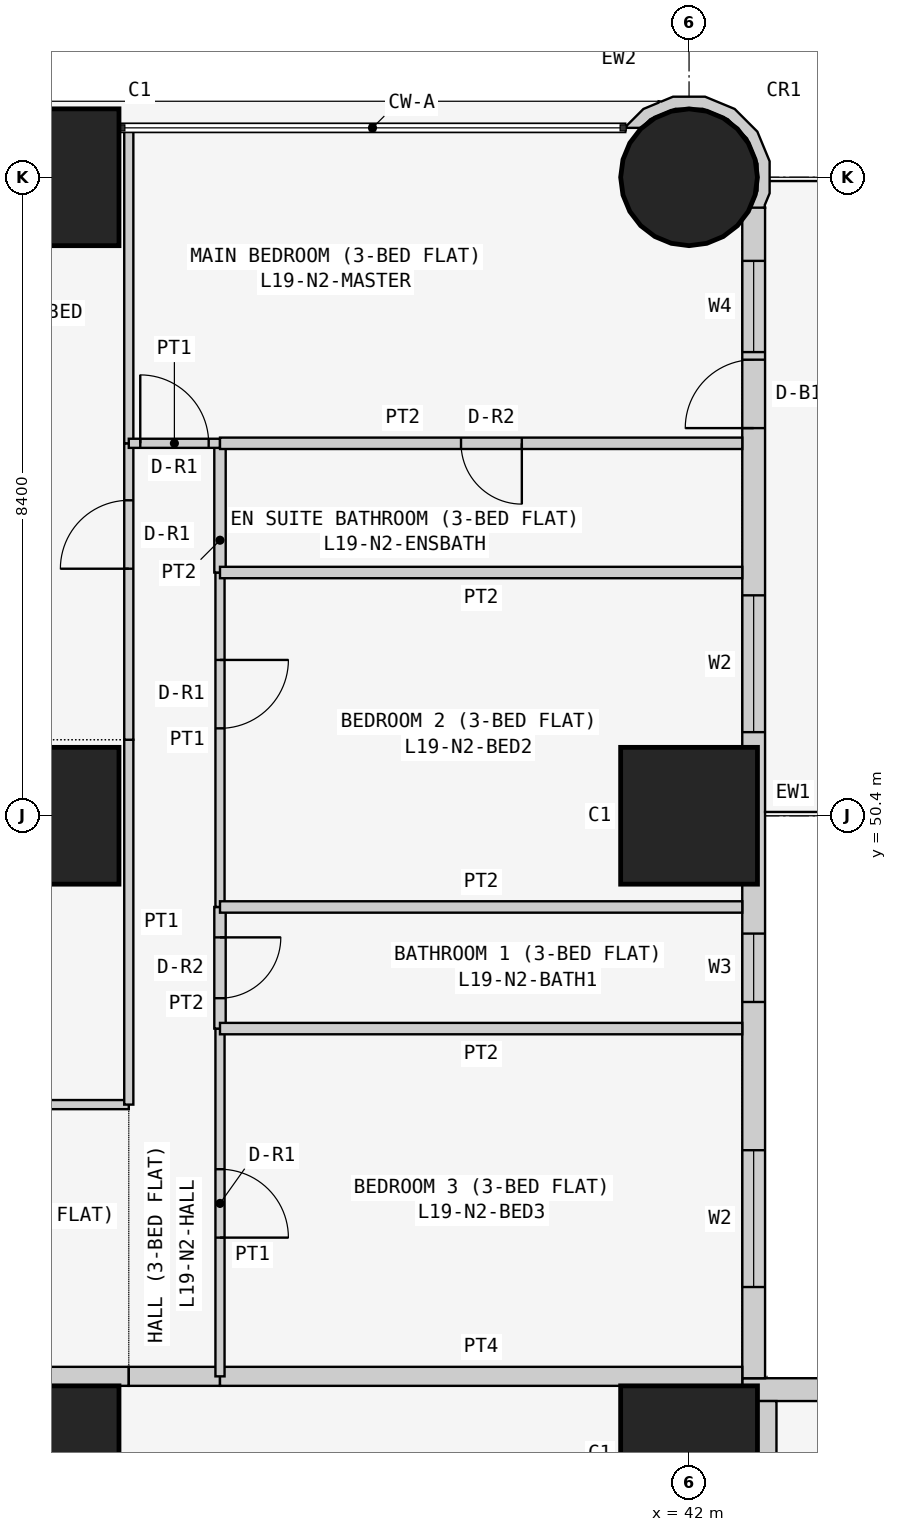
"""IFC4 building model, lengths in metres.
Left out: names, types, materials, properties, quantities, classifications, styles, units other than length and angle.
Written with IfcOpenShell. Run it as: python <this file> out.ifc"""

import sys

from ifc_helpers import new_model, si_unit, direction, frame, frame_2d, origin, origin_2d, place, context, subcontext, project, spatial, polyline, rectangle, circle, outline, extrude, element, fill, save


model = new_model("IFC4")
c1 = context("Model", 3, precision=1e-05, world=origin(), true_north=direction((0.0, 1.0)))
c2 = subcontext(c1, "Body", "Model", "MODEL_VIEW")
j1 = project(units=[si_unit("LENGTHUNIT", "METRE"), si_unit("PLANEANGLEUNIT", "RADIAN")], contexts=[c1])
p1 = place(None, origin())
s1 = spatial("IfcSite", under=j1, at=p1, CompositionType="ELEMENT")
p2 = place(p1, origin())
s2 = spatial("IfcBuilding", under=s1, at=p2, CompositionType="ELEMENT")
p3 = place(p2, frame((0.0, 0.0, 77.7)))
s3 = spatial("IfcBuildingStorey", under=s2, at=p3, CompositionType="ELEMENT", Elevation=77.7)
for number, where, z_axis, x_axis in (
    (1, (33.6, 42.0, 0.0), (0.0, 0.0, 1.0), (1.0, 0.0, 0.0)),
    (2, (33.6, 50.4, 0.0), (0.0, 0.0, 1.0), (1.0, 0.0, 0.0)),
    (3, (33.6, 58.8, 0.0), (0.0, 0.0, 1.0), (1.0, 0.0, 0.0)),
    (4, (42.0, 42.0, 0.0), (0.0, 0.0, 1.0), (1.0, 0.0, 0.0)),
    (5, (42.0, 50.4, 0.0), (0.0, 0.0, 1.0), (1.0, 0.0, 0.0)),
):
    element("IfcColumn", number, at=place(p3, frame(where, z_axis=z_axis, x_axis=x_axis)), inside=s3, PredefinedType="COLUMN", context=c2, shape_type="SweptSolid", body=[
        extrude(rectangle(XDim=1.8, YDim=1.8, at=origin_2d()), origin(), (0.0, 0.0, 1.0), 3.6),
    ])
p4 = place(p3, frame((42.0, 58.8, 0.0), z_axis=(0.0, 0.0, 1.0), x_axis=(1.0, 0.0, 0.0)))
e6 = element("IfcColumn", 6, at=p4, inside=s3, PredefinedType="COLUMN", context=c2, shape_type="SweptSolid", body=[
    extrude(circle(Radius=0.9, at=origin_2d()), origin(), (0.0, 0.0, 1.0), 3.6),
])
p5 = place(p3, frame((58.4, 42.85, 0.0), z_axis=(0.0, 0.0, 1.0), x_axis=(-1.0, 0.0, 0.0)))
e7 = element("IfcWall", 7, at=p5, inside=s3, PredefinedType="SOLIDWALL", context=c2, shape_type="SweptSolid", body=[
    extrude(rectangle(XDim=15.7, YDim=0.3, at=frame_2d((7.85, 0.0))), origin(), (0.0, 0.0, 1.0), 3.45),
])
p6 = place(p5, frame((12.4, 0.0, 0.9)))
e8 = element("IfcOpeningElement", 8, at=p6, cuts=e7, PredefinedType="OPENING", context=c2, shape_type="SweptSolid", body=[
    extrude(rectangle(XDim=1.8, YDim=1.5, at=frame_2d((0.9, 0.75))), frame((0.0, 0.16, 0.0), z_axis=(0.0, -1.0, 0.0), x_axis=(1.0, 0.0, 0.0)), (0.0, 0.0, 1.0), 0.32),
])
p7 = place(p5, frame((9.55, 0.0, 1.5)))
e9 = element("IfcOpeningElement", 9, at=p7, cuts=e7, PredefinedType="OPENING", context=c2, shape_type="SweptSolid", body=[
    extrude(rectangle(XDim=0.9, YDim=0.7, at=frame_2d((0.45, 0.35))), frame((0.0, 0.16, 0.0), z_axis=(0.0, -1.0, 0.0), x_axis=(1.0, 0.0, 0.0)), (0.0, 0.0, 1.0), 0.32),
])
p8 = place(p5, frame((5.1, 0.0, 0.9)))
e10 = element("IfcOpeningElement", 10, at=p8, cuts=e7, PredefinedType="OPENING", context=c2, shape_type="SweptSolid", body=[
    extrude(rectangle(XDim=1.8, YDim=1.5, at=frame_2d((0.9, 0.75))), frame((0.0, 0.16, 0.0), z_axis=(0.0, -1.0, 0.0), x_axis=(1.0, 0.0, 0.0)), (0.0, 0.0, 1.0), 0.32),
])
p9 = place(p5, frame((2.0, 0.0, 0.0)))
e11 = element("IfcOpeningElement", 11, at=p9, cuts=e7, PredefinedType="OPENING", context=c2, shape_type="SweptSolid", body=[
    extrude(rectangle(XDim=0.9, YDim=2.4, at=frame_2d((0.45, 1.2))), frame((0.0, 0.16, 0.0), z_axis=(0.0, -1.0, 0.0), x_axis=(1.0, 0.0, 0.0)), (0.0, 0.0, 1.0), 0.32),
])
p10 = place(p5, frame((0.7, 0.0, 0.9)))
e12 = element("IfcOpeningElement", 12, at=p10, cuts=e7, PredefinedType="OPENING", context=c2, shape_type="SweptSolid", body=[
    extrude(rectangle(XDim=1.2, YDim=1.5, at=frame_2d((0.6, 0.75))), frame((0.0, 0.16, 0.0), z_axis=(0.0, -1.0, 0.0), x_axis=(1.0, 0.0, 0.0)), (0.0, 0.0, 1.0), 0.32),
])
p11 = place(p3, frame((42.85, 43.0, 0.0), z_axis=(0.0, 0.0, 1.0), x_axis=(0.0, 1.0, 0.0)))
e13 = element("IfcWall", 13, at=p11, inside=s3, PredefinedType="SOLIDWALL", context=c2, shape_type="SweptSolid", body=[
    extrude(rectangle(XDim=15.4, YDim=0.3, at=frame_2d((7.7, 0.0))), origin(), (0.0, 0.0, 1.0), 3.45),
])
p12 = place(p11, frame((1.2, 0.0, 0.9)))
e14 = element("IfcOpeningElement", 14, at=p12, cuts=e13, PredefinedType="OPENING", context=c2, shape_type="SweptSolid", body=[
    extrude(rectangle(XDim=1.8, YDim=1.5, at=frame_2d((0.9, 0.75))), frame((0.0, 0.16, 0.0), z_axis=(0.0, -1.0, 0.0), x_axis=(1.0, 0.0, 0.0)), (0.0, 0.0, 1.0), 0.32),
])
p13 = place(p11, frame((4.95, 0.0, 1.5)))
e15 = element("IfcOpeningElement", 15, at=p13, cuts=e13, PredefinedType="OPENING", context=c2, shape_type="SweptSolid", body=[
    extrude(rectangle(XDim=0.9, YDim=0.7, at=frame_2d((0.45, 0.35))), frame((0.0, 0.16, 0.0), z_axis=(0.0, -1.0, 0.0), x_axis=(1.0, 0.0, 0.0)), (0.0, 0.0, 1.0), 0.32),
])
p14 = place(p11, frame((8.5, 0.0, 0.9)))
e16 = element("IfcOpeningElement", 16, at=p14, cuts=e13, PredefinedType="OPENING", context=c2, shape_type="SweptSolid", body=[
    extrude(rectangle(XDim=1.8, YDim=1.5, at=frame_2d((0.9, 0.75))), frame((0.0, 0.16, 0.0), z_axis=(0.0, -1.0, 0.0), x_axis=(1.0, 0.0, 0.0)), (0.0, 0.0, 1.0), 0.32),
])
p15 = place(p11, frame((12.5, 0.0, 0.0)))
e17 = element("IfcOpeningElement", 17, at=p15, cuts=e13, PredefinedType="OPENING", context=c2, shape_type="SweptSolid", body=[
    extrude(rectangle(XDim=0.9, YDim=2.4, at=frame_2d((0.45, 1.2))), frame((0.0, 0.16, 0.0), z_axis=(0.0, -1.0, 0.0), x_axis=(1.0, 0.0, 0.0)), (0.0, 0.0, 1.0), 0.32),
])
p16 = place(p11, frame((13.5, 0.0, 0.9)))
e18 = element("IfcOpeningElement", 18, at=p16, cuts=e13, PredefinedType="OPENING", context=c2, shape_type="SweptSolid", body=[
    extrude(rectangle(XDim=1.2, YDim=1.5, at=frame_2d((0.6, 0.75))), frame((0.0, 0.16, 0.0), z_axis=(0.0, -1.0, 0.0), x_axis=(1.0, 0.0, 0.0)), (0.0, 0.0, 1.0), 0.32),
])
p17 = place(p3, frame((42.91, 58.436, 0.0), z_axis=(0.0, 0.0, 1.0), x_axis=(0.377204953059, 0.926129809145, 0.0)))
e19 = element("IfcWall", 19, at=p17, inside=s3, PredefinedType="SOLIDWALL", context=c2, shape_type="SweptSolid", body=[
    extrude(outline(polyline([(0.769, 1.728), (0.75, 1.723), (0.6, 1.875), (0.295, 2.004), (0.281, 1.998), (0.36, 1.803), (0.509, 1.741), (0.761, 1.486), (0.896, 1.154), (0.894, 0.795), (0.755, 0.465), (0.5, 0.213), (0.168, 0.078), (-0.1, 0.08), (0.001, -0.097), (0.03, -0.08), (0.198, -0.081), (0.589, 0.078), (0.889, 0.374), (1.052, 0.763), (1.055, 1.185), (0.896, 1.575), (0.778, 1.695), (0.769, 1.728)])), origin(), (0.0, 0.0, 1.0), 3.45),
])
p18 = place(p3, frame((29.4, 43.025, 0.0), z_axis=(0.0, 0.0, 1.0), x_axis=(1.0, 0.0, 0.0)))
e20 = element("IfcWall", 20, at=p18, inside=s3, PredefinedType="PARTITIONING", context=c2, shape_type="SweptSolid", body=[
    extrude(rectangle(XDim=5.229, YDim=0.25, at=frame_2d((2.615, 0.0))), origin(), (0.0, 0.0, 1.0), 3.45),
])
p19 = place(p18, frame((2.1, 0.0, 0.0)))
e21 = element("IfcOpeningElement", 21, at=p19, cuts=e20, PredefinedType="OPENING", context=c2, shape_type="SweptSolid", body=[
    extrude(rectangle(XDim=1.0, YDim=2.1, at=frame_2d((0.5, 1.05))), frame((0.0, 0.135, 0.0), z_axis=(0.0, -1.0, 0.0), x_axis=(1.0, 0.0, 0.0)), (0.0, 0.0, 1.0), 0.27),
])
p20 = place(p3, frame((34.629, 43.025, 0.0), z_axis=(0.0, 0.0, 1.0), x_axis=(1.0, 0.0, 0.0)))
e22 = element("IfcWall", 22, at=p20, inside=s3, PredefinedType="PARTITIONING", context=c2, shape_type="SweptSolid", body=[
    extrude(rectangle(XDim=1.2, YDim=0.25, at=frame_2d((0.6, 0.0))), origin(), (0.0, 0.0, 1.0), 3.45),
])
for number, where, z_axis, x_axis in (
    (23, (35.829, 43.025, 0.0), (0.0, 0.0, 1.0), (1.0, 0.0, 0.0)),
    (24, (43.025, 42.7, 0.0), (0.0, 0.0, 1.0), (0.0, -1.0, 0.0)),
):
    element("IfcWall", number, at=place(p3, frame(where, z_axis=z_axis, x_axis=x_axis)), inside=s3, PredefinedType="PARTITIONING", context=c2, shape_type="SweptSolid", body=[
        extrude(rectangle(XDim=6.871, YDim=0.25, at=frame_2d((3.436, 0.0))), origin(), (0.0, 0.0, 1.0), 3.45),
    ])
p21 = place(p3, frame((29.4, 46.6, 0.0), z_axis=(0.0, 0.0, 1.0), x_axis=(1.0, 0.0, 0.0)))
e25 = element("IfcWall", 25, at=p21, inside=s3, PredefinedType="PARTITIONING", context=c2, shape_type="SweptSolid", body=[
    extrude(rectangle(XDim=5.229, YDim=0.12, at=frame_2d((2.615, 0.0))), origin(), (0.0, 0.0, 1.0), 3.45),
])
p22 = place(p21, frame((1.05, 0.0, 0.0)))
e26 = element("IfcOpeningElement", 26, at=p22, cuts=e25, PredefinedType="OPENING", context=c2, shape_type="SweptSolid", body=[
    extrude(rectangle(XDim=0.9, YDim=2.1, at=frame_2d((0.45, 1.05))), frame((0.0, 0.07, 0.0), z_axis=(0.0, -1.0, 0.0), x_axis=(1.0, 0.0, 0.0)), (0.0, 0.0, 1.0), 0.14),
])
p23 = place(p3, frame((34.629, 51.4, 0.0), z_axis=(0.0, 0.0, 1.0), x_axis=(0.0, -1.0, 0.0)))
e27 = element("IfcWall", 27, at=p23, inside=s3, PredefinedType="PARTITIONING", context=c2, shape_type="SweptSolid", body=[
    extrude(rectangle(XDim=4.8, YDim=0.12, at=frame_2d((2.4, 0.0))), origin(), (0.0, 0.0, 1.0), 3.45),
])
p24 = place(p3, frame((34.629, 55.3, 0.0), z_axis=(0.0, 0.0, 1.0), x_axis=(0.0, -1.0, 0.0)))
e28 = element("IfcWall", 28, at=p24, inside=s3, PredefinedType="PARTITIONING", context=c2, shape_type="SweptSolid", body=[
    extrude(rectangle(XDim=3.9, YDim=0.12, at=frame_2d((1.95, 0.0))), origin(), (0.0, 0.0, 1.0), 3.45),
])
p25 = place(p24, frame((0.75, 0.0, 0.0)))
e29 = element("IfcOpeningElement", 29, at=p25, cuts=e28, PredefinedType="OPENING", context=c2, shape_type="SweptSolid", body=[
    extrude(rectangle(XDim=0.9, YDim=2.1, at=frame_2d((0.45, 1.05))), frame((0.0, 0.07, 0.0), z_axis=(0.0, -1.0, 0.0), x_axis=(1.0, 0.0, 0.0)), (0.0, 0.0, 1.0), 0.14),
])
p26 = place(p3, frame((34.629, 59.45, 0.0), z_axis=(0.0, 0.0, 1.0), x_axis=(0.0, -1.0, 0.0)))
e30 = element("IfcWall", 30, at=p26, inside=s3, PredefinedType="PARTITIONING", context=c2, shape_type="SweptSolid", body=[
    extrude(rectangle(XDim=4.15, YDim=0.12, at=frame_2d((2.075, 0.0))), origin(), (0.0, 0.0, 1.0), 3.45),
])
p27 = place(p3, frame((35.829, 47.6, 0.0), z_axis=(0.0, 0.0, 1.0), x_axis=(0.0, -1.0, 0.0)))
e31 = element("IfcWall", 31, at=p27, inside=s3, PredefinedType="PARTITIONING", context=c2, shape_type="SweptSolid", body=[
    extrude(rectangle(XDim=4.575, YDim=0.12, at=frame_2d((2.288, 0.0))), origin(), (0.0, 0.0, 1.0), 3.45),
])
p28 = place(p27, frame((1.85, 0.0, 0.0)))
e32 = element("IfcOpeningElement", 32, at=p28, cuts=e31, PredefinedType="OPENING", context=c2, shape_type="SweptSolid", body=[
    extrude(rectangle(XDim=0.9, YDim=2.1, at=frame_2d((0.45, 1.05))), frame((0.0, 0.07, 0.0), z_axis=(0.0, -1.0, 0.0), x_axis=(1.0, 0.0, 0.0)), (0.0, 0.0, 1.0), 0.14),
])
p29 = place(p3, frame((35.829, 49.2, 0.0), z_axis=(0.0, 0.0, 1.0), x_axis=(0.0, -1.0, 0.0)))
e33 = element("IfcWall", 33, at=p29, inside=s3, PredefinedType="PARTITIONING", context=c2, shape_type="SweptSolid", body=[
    extrude(rectangle(XDim=1.6, YDim=0.15, at=frame_2d((0.8, 0.0))), origin(), (0.0, 0.0, 1.0), 3.45),
])
p30 = place(p29, frame((0.4, 0.0, 0.0)))
e34 = element("IfcOpeningElement", 34, at=p30, cuts=e33, PredefinedType="OPENING", context=c2, shape_type="SweptSolid", body=[
    extrude(rectangle(XDim=0.8, YDim=2.1, at=frame_2d((0.4, 1.05))), frame((0.0, 0.085, 0.0), z_axis=(0.0, -1.0, 0.0), x_axis=(1.0, 0.0, 0.0)), (0.0, 0.0, 1.0), 0.17),
])
p31 = place(p3, frame((35.829, 53.6, 0.0), z_axis=(0.0, 0.0, 1.0), x_axis=(0.0, -1.0, 0.0)))
e35 = element("IfcWall", 35, at=p31, inside=s3, PredefinedType="PARTITIONING", context=c2, shape_type="SweptSolid", body=[
    extrude(rectangle(XDim=4.4, YDim=0.12, at=frame_2d((2.2, 0.0))), origin(), (0.0, 0.0, 1.0), 3.45),
])
p32 = place(p31, frame((1.15, 0.0, 0.0)))
e36 = element("IfcOpeningElement", 36, at=p32, cuts=e35, PredefinedType="OPENING", context=c2, shape_type="SweptSolid", body=[
    extrude(rectangle(XDim=0.9, YDim=2.1, at=frame_2d((0.45, 1.05))), frame((0.0, 0.07, 0.0), z_axis=(0.0, -1.0, 0.0), x_axis=(1.0, 0.0, 0.0)), (0.0, 0.0, 1.0), 0.14),
])
p33 = place(p3, frame((35.829, 55.3, 0.0), z_axis=(0.0, 0.0, 1.0), x_axis=(0.0, -1.0, 0.0)))
e37 = element("IfcWall", 37, at=p33, inside=s3, PredefinedType="PARTITIONING", context=c2, shape_type="SweptSolid", body=[
    extrude(rectangle(XDim=1.7, YDim=0.15, at=frame_2d((0.85, 0.0))), origin(), (0.0, 0.0, 1.0), 3.45),
])
p34 = place(p3, frame((34.629, 55.3, 0.0), z_axis=(0.0, 0.0, 1.0), x_axis=(1.0, 0.0, 0.0)))
e38 = element("IfcWall", 38, at=p34, inside=s3, PredefinedType="PARTITIONING", context=c2, shape_type="SweptSolid", body=[
    extrude(rectangle(XDim=1.2, YDim=0.12, at=frame_2d((0.6, 0.0))), origin(), (0.0, 0.0, 1.0), 3.45),
])
p35 = place(p34, frame((0.151, 0.0, 0.0)))
e39 = element("IfcOpeningElement", 39, at=p35, cuts=e38, PredefinedType="OPENING", context=c2, shape_type="SweptSolid", body=[
    extrude(rectangle(XDim=0.9, YDim=2.1, at=frame_2d((0.45, 1.05))), frame((0.0, 0.07, 0.0), z_axis=(0.0, -1.0, 0.0), x_axis=(1.0, 0.0, 0.0)), (0.0, 0.0, 1.0), 0.14),
])
for number, where, z_axis, x_axis in (
    (40, (35.829, 47.6, 0.0), (0.0, 0.0, 1.0), (1.0, 0.0, 0.0)),
    (41, (35.829, 49.2, 0.0), (0.0, 0.0, 1.0), (1.0, 0.0, 0.0)),
    (42, (35.829, 53.6, 0.0), (0.0, 0.0, 1.0), (1.0, 0.0, 0.0)),
):
    element("IfcWall", number, at=place(p3, frame(where, z_axis=z_axis, x_axis=x_axis)), inside=s3, PredefinedType="PARTITIONING", context=c2, shape_type="SweptSolid", body=[
        extrude(rectangle(XDim=6.871, YDim=0.15, at=frame_2d((3.436, 0.0))), origin(), (0.0, 0.0, 1.0), 3.45),
    ])
p36 = place(p3, frame((35.829, 55.3, 0.0), z_axis=(0.0, 0.0, 1.0), x_axis=(1.0, 0.0, 0.0)))
e43 = element("IfcWall", 43, at=p36, inside=s3, PredefinedType="PARTITIONING", context=c2, shape_type="SweptSolid", body=[
    extrude(rectangle(XDim=6.871, YDim=0.15, at=frame_2d((3.436, 0.0))), origin(), (0.0, 0.0, 1.0), 3.45),
])
p37 = place(p36, frame((3.171, 0.0, 0.0)))
e44 = element("IfcOpeningElement", 44, at=p37, cuts=e43, PredefinedType="OPENING", context=c2, shape_type="SweptSolid", body=[
    extrude(rectangle(XDim=0.8, YDim=2.1, at=frame_2d((0.4, 1.05))), frame((0.0, 0.085, 0.0), z_axis=(0.0, -1.0, 0.0), x_axis=(1.0, 0.0, 0.0)), (0.0, 0.0, 1.0), 0.17),
])
p38 = place(p12, origin())
e45 = element("IfcWindow", 45, at=p38, inside=s3, PartitioningType="SINGLE_PANEL", PredefinedType="WINDOW", context=c2, shape_type="SweptSolid", body=[
    extrude(rectangle(XDim=1.8, YDim=1.5, at=frame_2d((0.9, 0.75))), frame((0.0, 0.03, 0.0), z_axis=(0.0, -1.0, 0.0), x_axis=(1.0, 0.0, 0.0)), (0.0, 0.0, 1.0), 0.06),
])
fill(e14, e45)
p39 = place(p13, origin())
e46 = element("IfcWindow", 46, at=p39, inside=s3, PartitioningType="SINGLE_PANEL", PredefinedType="WINDOW", context=c2, shape_type="SweptSolid", body=[
    extrude(rectangle(XDim=0.9, YDim=0.7, at=frame_2d((0.45, 0.35))), frame((0.0, 0.03, 0.0), z_axis=(0.0, -1.0, 0.0), x_axis=(1.0, 0.0, 0.0)), (0.0, 0.0, 1.0), 0.06),
])
fill(e15, e46)
p40 = place(p14, origin())
e47 = element("IfcWindow", 47, at=p40, inside=s3, PartitioningType="SINGLE_PANEL", PredefinedType="WINDOW", context=c2, shape_type="SweptSolid", body=[
    extrude(rectangle(XDim=1.8, YDim=1.5, at=frame_2d((0.9, 0.75))), frame((0.0, 0.03, 0.0), z_axis=(0.0, -1.0, 0.0), x_axis=(1.0, 0.0, 0.0)), (0.0, 0.0, 1.0), 0.06),
])
fill(e16, e47)
p41 = place(p15, origin())
e48 = element("IfcDoor", 48, at=p41, inside=s3, OperationType="SINGLE_SWING_LEFT", PredefinedType="DOOR", context=c2, shape_type="SweptSolid", body=[
    extrude(rectangle(XDim=0.9, YDim=2.4, at=frame_2d((0.45, 1.2))), frame((0.0, 0.025, 0.0), z_axis=(0.0, -1.0, 0.0), x_axis=(1.0, 0.0, 0.0)), (0.0, 0.0, 1.0), 0.05),
])
fill(e17, e48)
p42 = place(p16, origin())
e49 = element("IfcWindow", 49, at=p42, inside=s3, PartitioningType="SINGLE_PANEL", PredefinedType="WINDOW", context=c2, shape_type="SweptSolid", body=[
    extrude(rectangle(XDim=1.2, YDim=1.5, at=frame_2d((0.6, 0.75))), frame((0.0, 0.03, 0.0), z_axis=(0.0, -1.0, 0.0), x_axis=(1.0, 0.0, 0.0)), (0.0, 0.0, 1.0), 0.06),
])
fill(e18, e49)
p43 = place(p25, frame((0.9, 0.0, 0.0), z_axis=(0.0, 0.0, 1.0), x_axis=(-1.0, 0.0, 0.0)))
e50 = element("IfcDoor", 50, at=p43, inside=s3, OperationType="SINGLE_SWING_LEFT", PredefinedType="DOOR", context=c2, shape_type="SweptSolid", body=[
    extrude(rectangle(XDim=0.9, YDim=2.1, at=frame_2d((0.45, 1.05))), frame((0.0, 0.025, 0.0), z_axis=(0.0, -1.0, 0.0), x_axis=(1.0, 0.0, 0.0)), (0.0, 0.0, 1.0), 0.05),
])
fill(e29, e50)
p44 = place(p28, origin())
e51 = element("IfcDoor", 51, at=p44, inside=s3, OperationType="SINGLE_SWING_RIGHT", PredefinedType="DOOR", context=c2, shape_type="SweptSolid", body=[
    extrude(rectangle(XDim=0.9, YDim=2.1, at=frame_2d((0.45, 1.05))), frame((0.0, 0.025, 0.0), z_axis=(0.0, -1.0, 0.0), x_axis=(1.0, 0.0, 0.0)), (0.0, 0.0, 1.0), 0.05),
])
fill(e32, e51)
p45 = place(p30, origin())
e52 = element("IfcDoor", 52, at=p45, inside=s3, OperationType="SINGLE_SWING_LEFT", PredefinedType="DOOR", context=c2, shape_type="SweptSolid", body=[
    extrude(rectangle(XDim=0.8, YDim=2.1, at=frame_2d((0.4, 1.05))), frame((0.0, 0.025, 0.0), z_axis=(0.0, -1.0, 0.0), x_axis=(1.0, 0.0, 0.0)), (0.0, 0.0, 1.0), 0.05),
])
fill(e34, e52)
p46 = place(p32, origin())
e53 = element("IfcDoor", 53, at=p46, inside=s3, OperationType="SINGLE_SWING_LEFT", PredefinedType="DOOR", context=c2, shape_type="SweptSolid", body=[
    extrude(rectangle(XDim=0.9, YDim=2.1, at=frame_2d((0.45, 1.05))), frame((0.0, 0.025, 0.0), z_axis=(0.0, -1.0, 0.0), x_axis=(1.0, 0.0, 0.0)), (0.0, 0.0, 1.0), 0.05),
])
fill(e36, e53)
p47 = place(p35, origin())
e54 = element("IfcDoor", 54, at=p47, inside=s3, OperationType="SINGLE_SWING_LEFT", PredefinedType="DOOR", context=c2, shape_type="SweptSolid", body=[
    extrude(rectangle(XDim=0.9, YDim=2.1, at=frame_2d((0.45, 1.05))), frame((0.0, 0.025, 0.0), z_axis=(0.0, -1.0, 0.0), x_axis=(1.0, 0.0, 0.0)), (0.0, 0.0, 1.0), 0.05),
])
fill(e39, e54)
p48 = place(p37, frame((0.8, 0.0, 0.0), z_axis=(0.0, 0.0, 1.0), x_axis=(-1.0, 0.0, 0.0)))
e55 = element("IfcDoor", 55, at=p48, inside=s3, OperationType="SINGLE_SWING_LEFT", PredefinedType="DOOR", context=c2, shape_type="SweptSolid", body=[
    extrude(rectangle(XDim=0.8, YDim=2.1, at=frame_2d((0.4, 1.05))), frame((0.0, 0.025, 0.0), z_axis=(0.0, -1.0, 0.0), x_axis=(1.0, 0.0, 0.0)), (0.0, 0.0, 1.0), 0.05),
])
fill(e44, e55)
save(model, sys.argv[1])
